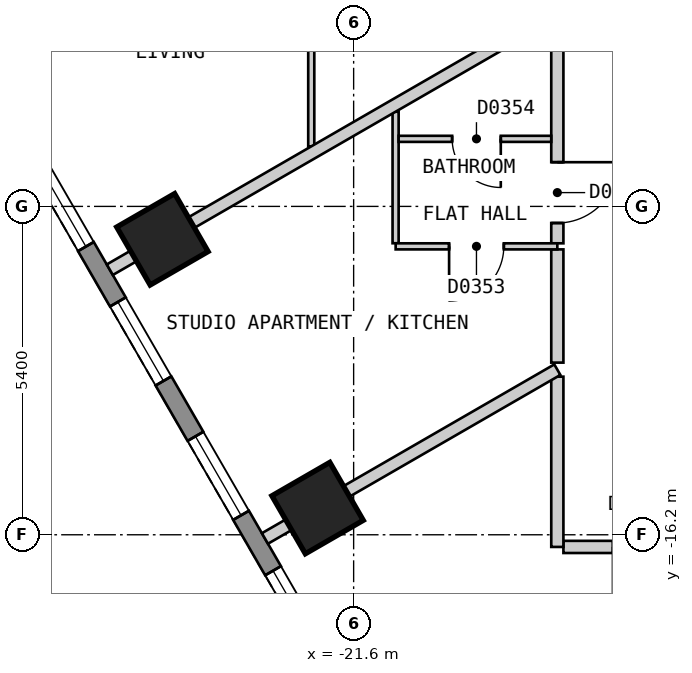
"""IFC4 building model, lengths in metres.
Left out: names, types, materials, properties, quantities, classifications, styles, units other than length and angle.
Written with IfcOpenShell. Run it as: python <this file> out.ifc"""

import sys

from ifc_helpers import new_model, si_unit, direction, frame, frame_2d, origin, origin_2d, place, context, subcontext, project, spatial, polyline, rectangle, outline, extrude, element, fill, save


model = new_model("IFC4")
c1 = context("Model", 3, precision=1e-05, world=origin(), true_north=direction((0.0, 1.0)))
c2 = subcontext(c1, "Body", "Model", "MODEL_VIEW")
j1 = project(units=[si_unit("LENGTHUNIT", "METRE"), si_unit("PLANEANGLEUNIT", "RADIAN")], contexts=[c1])
p1 = place(None, origin())
s1 = spatial("IfcSite", under=j1, at=p1, CompositionType="ELEMENT")
p2 = place(p1, origin())
s2 = spatial("IfcBuilding", under=s1, at=p2, CompositionType="ELEMENT")
p3 = place(p2, frame((0.0, 0.0, 59.4)))
s3 = spatial("IfcBuildingStorey", under=s2, at=p3, CompositionType="ELEMENT", Elevation=59.4)
for number, where, z_axis, x_axis in (
    (1, (-24.745, -11.341, 0.0), (0.0, 0.0, 1.0), (0.5, -0.866, 0.0)),
    (2, (-22.193, -15.761, 0.0), (0.0, 0.0, 1.0), (0.5, -0.866, 0.0)),
):
    element("IfcColumn", number, at=place(p3, frame(where, z_axis=z_axis, x_axis=x_axis)), inside=s3, PredefinedType="COLUMN", context=c2, shape_type="SweptSolid", body=[
        extrude(rectangle(XDim=1.1, YDim=1.1, at=origin_2d()), origin(), (0.0, 0.0, 1.0), 3.0),
    ])
p4 = place(p3, frame((-31.22, -2.425, 0.0), z_axis=(0.0, 0.0, 1.0), x_axis=(0.500001938803, -0.866024284413, 0.0)))
e3 = element("IfcWall", 3, at=p4, inside=s3, PredefinedType="SOLIDWALL", context=c2, shape_type="SweptSolid", body=[
    extrude(outline(polyline([(0.0, -0.15), (27.02, -0.15), (26.94, 0.15), (0.08, 0.15), (0.0, -0.15)])), origin(), (0.0, 0.0, 1.0), 2.6),
])
p5 = place(p4, frame((1.277, 0.0, 0.15)))
e4 = element("IfcOpeningElement", 4, at=p5, cuts=e3, PredefinedType="OPENING", context=c2, shape_type="SweptSolid", body=[
    extrude(rectangle(XDim=1.5, YDim=2.1, at=frame_2d((0.75, 1.05))), frame((0.0, 0.16, 0.0), z_axis=(0.0, -1.0, 0.0), x_axis=(1.0, 0.0, 0.0)), (0.0, 0.0, 1.0), 0.32),
])
p6 = place(p4, frame((3.829, 0.0, 0.15)))
e5 = element("IfcOpeningElement", 5, at=p6, cuts=e3, PredefinedType="OPENING", context=c2, shape_type="SweptSolid", body=[
    extrude(rectangle(XDim=1.5, YDim=2.1, at=frame_2d((0.75, 1.05))), frame((0.0, 0.16, 0.0), z_axis=(0.0, -1.0, 0.0), x_axis=(1.0, 0.0, 0.0)), (0.0, 0.0, 1.0), 0.32),
])
p7 = place(p4, frame((6.382, 0.0, 0.15)))
e6 = element("IfcOpeningElement", 6, at=p7, cuts=e3, PredefinedType="OPENING", context=c2, shape_type="SweptSolid", body=[
    extrude(rectangle(XDim=1.5, YDim=2.1, at=frame_2d((0.75, 1.05))), frame((0.0, 0.16, 0.0), z_axis=(0.0, -1.0, 0.0), x_axis=(1.0, 0.0, 0.0)), (0.0, 0.0, 1.0), 0.32),
])
p8 = place(p4, frame((8.933, 0.0, 0.15)))
e7 = element("IfcOpeningElement", 7, at=p8, cuts=e3, PredefinedType="OPENING", context=c2, shape_type="SweptSolid", body=[
    extrude(rectangle(XDim=1.5, YDim=2.1, at=frame_2d((0.75, 1.05))), frame((0.0, 0.16, 0.0), z_axis=(0.0, -1.0, 0.0), x_axis=(1.0, 0.0, 0.0)), (0.0, 0.0, 1.0), 0.32),
])
p9 = place(p4, frame((11.485, 0.0, 0.15)))
e8 = element("IfcOpeningElement", 8, at=p9, cuts=e3, PredefinedType="OPENING", context=c2, shape_type="SweptSolid", body=[
    extrude(rectangle(XDim=1.5, YDim=2.1, at=frame_2d((0.75, 1.05))), frame((0.0, 0.16, 0.0), z_axis=(0.0, -1.0, 0.0), x_axis=(1.0, 0.0, 0.0)), (0.0, 0.0, 1.0), 0.32),
])
p10 = place(p4, frame((14.037, 0.0, 0.15)))
e9 = element("IfcOpeningElement", 9, at=p10, cuts=e3, PredefinedType="OPENING", context=c2, shape_type="SweptSolid", body=[
    extrude(rectangle(XDim=1.5, YDim=2.1, at=frame_2d((0.75, 1.05))), frame((0.0, 0.16, 0.0), z_axis=(0.0, -1.0, 0.0), x_axis=(1.0, 0.0, 0.0)), (0.0, 0.0, 1.0), 0.32),
])
p11 = place(p4, frame((16.589, 0.0, 0.15)))
e10 = element("IfcOpeningElement", 10, at=p11, cuts=e3, PredefinedType="OPENING", context=c2, shape_type="SweptSolid", body=[
    extrude(rectangle(XDim=1.5, YDim=2.1, at=frame_2d((0.75, 1.05))), frame((0.0, 0.16, 0.0), z_axis=(0.0, -1.0, 0.0), x_axis=(1.0, 0.0, 0.0)), (0.0, 0.0, 1.0), 0.32),
])
p12 = place(p4, frame((19.141, 0.0, 0.15)))
e11 = element("IfcOpeningElement", 11, at=p12, cuts=e3, PredefinedType="OPENING", context=c2, shape_type="SweptSolid", body=[
    extrude(rectangle(XDim=1.5, YDim=2.1, at=frame_2d((0.75, 1.05))), frame((0.0, 0.16, 0.0), z_axis=(0.0, -1.0, 0.0), x_axis=(1.0, 0.0, 0.0)), (0.0, 0.0, 1.0), 0.32),
])
p13 = place(p4, frame((21.693, 0.0, 0.15)))
e12 = element("IfcOpeningElement", 12, at=p13, cuts=e3, PredefinedType="OPENING", context=c2, shape_type="SweptSolid", body=[
    extrude(rectangle(XDim=1.5, YDim=2.1, at=frame_2d((0.75, 1.05))), frame((0.0, 0.16, 0.0), z_axis=(0.0, -1.0, 0.0), x_axis=(1.0, 0.0, 0.0)), (0.0, 0.0, 1.0), 0.32),
])
p14 = place(p4, frame((24.244, 0.0, 0.15)))
e13 = element("IfcOpeningElement", 13, at=p14, cuts=e3, PredefinedType="OPENING", context=c2, shape_type="SweptSolid", body=[
    extrude(rectangle(XDim=1.5, YDim=2.1, at=frame_2d((0.75, 1.05))), frame((0.0, 0.16, 0.0), z_axis=(0.0, -1.0, 0.0), x_axis=(1.0, 0.0, 0.0)), (0.0, 0.0, 1.0), 0.32),
])
p15 = place(p3, frame((-18.25, -11.507, 0.0), z_axis=(0.0, 0.0, 1.0), x_axis=(0.0, -1.0, 0.0)))
e14 = element("IfcWall", 14, at=p15, inside=s3, PredefinedType="PARTITIONING", context=c2, shape_type="SweptSolid", body=[
    extrude(rectangle(XDim=1.862, YDim=0.2, at=frame_2d((0.931, 0.0))), origin(), (0.0, 0.0, 1.0), 2.6),
])
p16 = place(p3, frame((-18.15, -16.4, 0.0), z_axis=(0.0, 0.0, 1.0), x_axis=(1.0, 0.0, 0.0)))
e15 = element("IfcWall", 15, at=p16, inside=s3, PredefinedType="PARTITIONING", context=c2, shape_type="SweptSolid", body=[
    extrude(rectangle(XDim=2.55, YDim=0.2, at=frame_2d((1.275, 0.0))), origin(), (0.0, 0.0, 1.0), 2.6),
])
p17 = place(p16, frame((0.815, 0.0, 0.0)))
e16 = element("IfcOpeningElement", 16, at=p17, cuts=e15, PredefinedType="OPENING", context=c2, shape_type="SweptSolid", body=[
    extrude(rectangle(XDim=0.8, YDim=2.1, at=frame_2d((0.4, 1.05))), frame((0.0, 0.11, 0.0), z_axis=(0.0, -1.0, 0.0), x_axis=(1.0, 0.0, 0.0)), (0.0, 0.0, 1.0), 0.22),
])
p18 = place(p3, frame((-18.25, -16.4, 0.0), z_axis=(0.0, 0.0, 1.0), x_axis=(0.0, 1.0, 0.0)))
e17 = element("IfcWall", 17, at=p18, inside=s3, PredefinedType="PARTITIONING", context=c2, shape_type="SweptSolid", body=[
    extrude(rectangle(XDim=2.8, YDim=0.2, at=frame_2d((1.4, 0.0))), origin(), (0.0, 0.0, 1.0), 2.6),
])
p19 = place(p3, frame((-18.25, -11.407, 0.0), z_axis=(0.0, 0.0, 1.0), x_axis=(0.0, 1.0, 0.0)))
e18 = element("IfcWall", 18, at=p19, inside=s3, PredefinedType="PARTITIONING", context=c2, shape_type="SweptSolid", body=[
    extrude(rectangle(XDim=3.665, YDim=0.2, at=frame_2d((1.833, 0.0))), origin(), (0.0, 0.0, 1.0), 2.6),
])
p20 = place(p19, frame((0.334, 0.0, 0.0)))
e19 = element("IfcOpeningElement", 19, at=p20, cuts=e18, PredefinedType="OPENING", context=c2, shape_type="SweptSolid", body=[
    extrude(rectangle(XDim=1.0, YDim=2.1, at=frame_2d((0.5, 1.05))), frame((0.0, 0.11, 0.0), z_axis=(0.0, -1.0, 0.0), x_axis=(1.0, 0.0, 0.0)), (0.0, 0.0, 1.0), 0.22),
])
p21 = place(p3, frame((-20.91, -9.243, 0.0), z_axis=(0.0, 0.0, 1.0), x_axis=(0.0, -1.0, 0.0)))
e20 = element("IfcWall", 20, at=p21, inside=s3, PredefinedType="PARTITIONING", context=c2, shape_type="SweptSolid", body=[
    extrude(rectangle(XDim=2.163, YDim=0.1, at=frame_2d((1.082, 0.0))), origin(), (0.0, 0.0, 1.0), 2.6),
])
p22 = place(p3, frame((-20.86, -9.689, 0.0), z_axis=(0.0, 0.0, 1.0), x_axis=(1.0, 0.0, 0.0)))
e21 = element("IfcWall", 21, at=p22, inside=s3, PredefinedType="PARTITIONING", context=c2, shape_type="SweptSolid", body=[
    extrude(rectangle(XDim=2.51, YDim=0.1, at=frame_2d((1.255, 0.0))), origin(), (0.0, 0.0, 1.0), 2.6),
])
p23 = place(p22, frame((0.88, 0.0, 0.0)))
e22 = element("IfcOpeningElement", 22, at=p23, cuts=e21, PredefinedType="OPENING", context=c2, shape_type="SweptSolid", body=[
    extrude(rectangle(XDim=0.8, YDim=2.1, at=frame_2d((0.4, 1.05))), frame((0.0, 0.06, 0.0), z_axis=(0.0, -1.0, 0.0), x_axis=(1.0, 0.0, 0.0)), (0.0, 0.0, 1.0), 0.12),
])
p24 = place(p3, frame((-20.909, -11.457, 0.0), z_axis=(0.0, 0.0, 1.0), x_axis=(1.0, 0.0, 0.0)))
e23 = element("IfcWall", 23, at=p24, inside=s3, PredefinedType="PARTITIONING", context=c2, shape_type="SweptSolid", body=[
    extrude(rectangle(XDim=2.659, YDim=0.1, at=frame_2d((1.33, 0.0))), origin(), (0.0, 0.0, 1.0), 2.6),
])
p25 = place(p24, frame((0.879, 0.0, 0.0)))
e24 = element("IfcOpeningElement", 24, at=p25, cuts=e23, PredefinedType="OPENING", context=c2, shape_type="SweptSolid", body=[
    extrude(rectangle(XDim=0.9, YDim=2.1, at=frame_2d((0.45, 1.05))), frame((0.0, 0.06, 0.0), z_axis=(0.0, -1.0, 0.0), x_axis=(1.0, 0.0, 0.0)), (0.0, 0.0, 1.0), 0.12),
])
p26 = place(p3, frame((-22.297, -9.813, 0.0), z_axis=(0.0, 0.0, 1.0), x_axis=(0.0, 1.0, 0.0)))
e25 = element("IfcWall", 25, at=p26, inside=s3, PredefinedType="PARTITIONING", context=c2, shape_type="SweptSolid", body=[
    extrude(rectangle(XDim=4.338, YDim=0.1, at=frame_2d((2.169, 0.0))), origin(), (0.0, 0.0, 1.0), 2.6),
])
p27 = place(p26, frame((2.818, 0.0, 0.0)))
e26 = element("IfcOpeningElement", 26, at=p27, cuts=e25, PredefinedType="OPENING", context=c2, shape_type="SweptSolid", body=[
    extrude(rectangle(XDim=0.9, YDim=2.1, at=frame_2d((0.45, 1.05))), frame((0.0, 0.06, 0.0), z_axis=(0.0, -1.0, 0.0), x_axis=(1.0, 0.0, 0.0)), (0.0, 0.0, 1.0), 0.12),
])
p28 = place(p3, frame((-23.059, -16.261, 0.0), z_axis=(0.0, 0.0, 1.0), x_axis=(0.866075767886, 0.499912756669, 0.0)))
e27 = element("IfcWall", 27, at=p28, inside=s3, PredefinedType="PARTITIONING", context=c2, shape_type="SweptSolid", body=[
    extrude(rectangle(XDim=5.553, YDim=0.2, at=frame_2d((2.776, 0.0))), origin(), (0.0, 0.0, 1.0), 2.6),
])
p29 = place(p3, frame((-25.61, -11.841, 0.0), z_axis=(0.0, 0.0, 1.0), x_axis=(0.866019023803, 0.500011050288, 0.0)))
e28 = element("IfcWall", 28, at=p29, inside=s3, PredefinedType="PARTITIONING", context=c2, shape_type="SweptSolid", body=[
    extrude(rectangle(XDim=8.47, YDim=0.2, at=frame_2d((4.235, 0.0))), origin(), (0.0, 0.0, 1.0), 2.6),
])
p30 = place(p8, origin())
e29 = element("IfcWindow", 29, at=p30, inside=s3, PartitioningType="SINGLE_PANEL", PredefinedType="WINDOW", context=c2, shape_type="SweptSolid", body=[
    extrude(rectangle(XDim=1.5, YDim=2.1, at=frame_2d((0.75, 1.05))), frame((0.0, 0.03, 0.0), z_axis=(0.0, -1.0, 0.0), x_axis=(1.0, 0.0, 0.0)), (0.0, 0.0, 1.0), 0.06),
])
fill(e7, e29)
p31 = place(p9, origin())
e30 = element("IfcWindow", 30, at=p31, inside=s3, PartitioningType="SINGLE_PANEL", PredefinedType="WINDOW", context=c2, shape_type="SweptSolid", body=[
    extrude(rectangle(XDim=1.5, YDim=2.1, at=frame_2d((0.75, 1.05))), frame((0.0, 0.03, 0.0), z_axis=(0.0, -1.0, 0.0), x_axis=(1.0, 0.0, 0.0)), (0.0, 0.0, 1.0), 0.06),
])
fill(e8, e30)
p32 = place(p10, origin())
e31 = element("IfcWindow", 31, at=p32, inside=s3, PartitioningType="SINGLE_PANEL", PredefinedType="WINDOW", context=c2, shape_type="SweptSolid", body=[
    extrude(rectangle(XDim=1.5, YDim=2.1, at=frame_2d((0.75, 1.05))), frame((0.0, 0.03, 0.0), z_axis=(0.0, -1.0, 0.0), x_axis=(1.0, 0.0, 0.0)), (0.0, 0.0, 1.0), 0.06),
])
fill(e9, e31)
p33 = place(p11, origin())
e32 = element("IfcWindow", 32, at=p33, inside=s3, PartitioningType="SINGLE_PANEL", PredefinedType="WINDOW", context=c2, shape_type="SweptSolid", body=[
    extrude(rectangle(XDim=1.5, YDim=2.1, at=frame_2d((0.75, 1.05))), frame((0.0, 0.03, 0.0), z_axis=(0.0, -1.0, 0.0), x_axis=(1.0, 0.0, 0.0)), (0.0, 0.0, 1.0), 0.06),
])
fill(e10, e32)
p34 = place(p20, origin())
e33 = element("IfcDoor", 33, at=p34, inside=s3, OperationType="SINGLE_SWING_RIGHT", PredefinedType="DOOR", context=c2, shape_type="SweptSolid", body=[
    extrude(rectangle(XDim=1.0, YDim=2.1, at=frame_2d((0.5, 1.05))), frame((0.0, 0.025, 0.0), z_axis=(0.0, -1.0, 0.0), x_axis=(1.0, 0.0, 0.0)), (0.0, 0.0, 1.0), 0.05),
])
fill(e19, e33)
p35 = place(p25, origin())
e34 = element("IfcDoor", 34, at=p35, inside=s3, OperationType="SINGLE_SWING_LEFT", PredefinedType="DOOR", context=c2, shape_type="SweptSolid", body=[
    extrude(rectangle(XDim=0.9, YDim=2.1, at=frame_2d((0.45, 1.05))), frame((0.0, 0.025, 0.0), z_axis=(0.0, -1.0, 0.0), x_axis=(1.0, 0.0, 0.0)), (0.0, 0.0, 1.0), 0.05),
])
fill(e24, e34)
p36 = place(p23, origin())
e35 = element("IfcDoor", 35, at=p36, inside=s3, OperationType="SINGLE_SWING_RIGHT", PredefinedType="DOOR", context=c2, shape_type="SweptSolid", body=[
    extrude(rectangle(XDim=0.8, YDim=2.1, at=frame_2d((0.4, 1.05))), frame((0.0, 0.025, 0.0), z_axis=(0.0, -1.0, 0.0), x_axis=(1.0, 0.0, 0.0)), (0.0, 0.0, 1.0), 0.05),
])
fill(e22, e35)
save(model, sys.argv[1])
